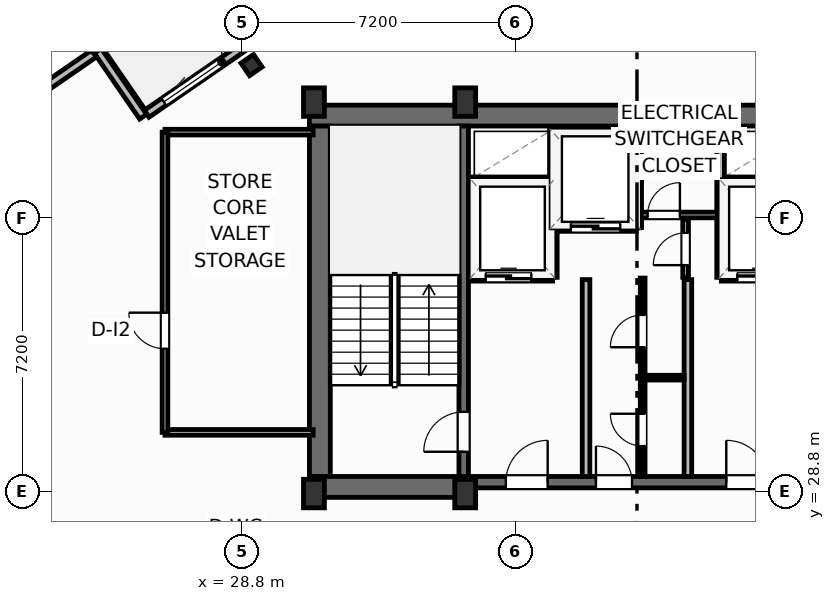
"""IFC4 building model, lengths in metres.
Left out: names, types, materials, properties, quantities, classifications, styles, units other than length and angle.
Written with IfcOpenShell. Run it as: python <this file> out.ifc"""

import sys

from ifc_helpers import new_model, si_unit, direction, frame, frame_2d, origin, origin_2d, place, context, subcontext, project, spatial, rectangle, i_section, extrude, element, fill, save


model = new_model("IFC4")
c1 = context("Model", 3, precision=1e-05, world=origin(), true_north=direction((0.0, 1.0)))
c2 = subcontext(c1, "Body", "Model", "MODEL_VIEW")
j1 = project(units=[si_unit("LENGTHUNIT", "METRE"), si_unit("PLANEANGLEUNIT", "RADIAN")], contexts=[c1])
p1 = place(None, origin())
s1 = spatial("IfcSite", under=j1, at=p1, CompositionType="ELEMENT")
p2 = place(p1, origin())
s2 = spatial("IfcBuilding", under=s1, at=p2, CompositionType="ELEMENT")
p3 = place(p2, frame((0.0, 0.0, 280.4)))
s3 = spatial("IfcBuildingStorey", under=s2, at=p3, CompositionType="ELEMENT", Elevation=280.4)
for number, where, z_axis, x_axis in (
    (1, (30.7, 28.75, 0.0), (0.0, 0.0, 1.0), (1.0, 0.0, 0.0)),
    (2, (34.68, 28.75, 0.0), (0.0, 0.0, 1.0), (1.0, 0.0, 0.0)),
    (3, (30.7, 39.05, 0.0), (0.0, 0.0, 1.0), (1.0, 0.0, 0.0)),
    (4, (34.68, 39.05, 0.0), (0.0, 0.0, 1.0), (1.0, 0.0, 0.0)),
):
    element("IfcColumn", number, at=place(p3, frame(where, z_axis=z_axis, x_axis=x_axis)), inside=s3, PredefinedType="COLUMN", context=c2, shape_type="SweptSolid", body=[
        extrude(rectangle(XDim=0.55, YDim=0.75, at=origin_2d()), origin(), (0.0, 0.0, 1.0), 3.7),
    ])
p4 = place(p3, frame((30.58, 38.695, 0.0), z_axis=(0.0, 0.0, 1.0), x_axis=(1.0, 0.0, 0.0)))
e5 = element("IfcWall", 5, at=p4, inside=s3, PredefinedType="SHEAR", context=c2, shape_type="SweptSolid", body=[
    extrude(rectangle(XDim=17.24, YDim=0.55, at=frame_2d((8.62, 0.0))), origin(), (0.0, 0.0, 1.0), 3.45),
])
p5 = place(p3, frame((30.855, 29.2, 0.0), z_axis=(0.0, 0.0, 1.0), x_axis=(0.0, 1.0, 0.0)))
e6 = element("IfcWall", 6, at=p5, inside=s3, PredefinedType="SHEAR", context=c2, shape_type="SweptSolid", body=[
    extrude(rectangle(XDim=9.22, YDim=0.55, at=frame_2d((4.61, 0.0))), origin(), (0.0, 0.0, 1.0), 3.45),
])
p6 = place(p3, frame((30.58, 28.925, 0.0), z_axis=(0.0, 0.0, 1.0), x_axis=(1.0, 0.0, 0.0)))
e7 = element("IfcWall", 7, at=p6, inside=s3, PredefinedType="SHEAR", context=c2, shape_type="SweptSolid", body=[
    extrude(rectangle(XDim=4.22, YDim=0.55, at=frame_2d((2.11, 0.0))), origin(), (0.0, 0.0, 1.0), 3.45),
])
p7 = place(p3, frame((34.8, 29.05, 0.0), z_axis=(0.0, 0.0, 1.0), x_axis=(1.0, 0.0, 0.0)))
e8 = element("IfcWall", 8, at=p7, inside=s3, PredefinedType="SHEAR", context=c2, shape_type="SweptSolid", body=[
    extrude(rectangle(XDim=8.8, YDim=0.3, at=frame_2d((4.4, 0.0))), origin(), (0.0, 0.0, 1.0), 3.45),
])
p8 = place(p7, frame((0.95, 0.0, 0.0)))
e9 = element("IfcOpeningElement", 9, at=p8, cuts=e8, PredefinedType="OPENING", context=c2, shape_type="SweptSolid", body=[
    extrude(rectangle(XDim=1.1, YDim=2.15, at=frame_2d((0.55, 1.075))), frame((0.0, 0.16, 0.0), z_axis=(0.0, -1.0, 0.0), x_axis=(1.0, 0.0, 0.0)), (0.0, 0.0, 1.0), 0.32),
])
p9 = place(p7, frame((6.75, 0.0, 0.0)))
e10 = element("IfcOpeningElement", 10, at=p9, cuts=e8, PredefinedType="OPENING", context=c2, shape_type="SweptSolid", body=[
    extrude(rectangle(XDim=1.1, YDim=2.15, at=frame_2d((0.55, 1.075))), frame((0.0, 0.16, 0.0), z_axis=(0.0, -1.0, 0.0), x_axis=(1.0, 0.0, 0.0)), (0.0, 0.0, 1.0), 0.32),
])
p10 = place(p7, frame((3.32, 0.0, 0.0)))
e11 = element("IfcOpeningElement", 11, at=p10, cuts=e8, PredefinedType="OPENING", context=c2, shape_type="SweptSolid", body=[
    extrude(rectangle(XDim=0.95, YDim=2.15, at=frame_2d((0.475, 1.075))), frame((0.0, 0.16, 0.0), z_axis=(0.0, -1.0, 0.0), x_axis=(1.0, 0.0, 0.0)), (0.0, 0.0, 1.0), 0.32),
])
p11 = place(p3, frame((34.64, 29.2, 0.0), z_axis=(0.0, 0.0, 1.0), x_axis=(0.0, 1.0, 0.0)))
e12 = element("IfcWall", 12, at=p11, inside=s3, PredefinedType="SHEAR", context=c2, shape_type="SweptSolid", body=[
    extrude(rectangle(XDim=9.22, YDim=0.25, at=frame_2d((4.61, 0.0))), origin(), (0.0, 0.0, 1.0), 3.45),
])
p12 = place(p11, frame((0.65, 0.0, 0.0)))
e13 = element("IfcOpeningElement", 13, at=p12, cuts=e12, PredefinedType="OPENING", context=c2, shape_type="SweptSolid", body=[
    extrude(rectangle(XDim=1.05, YDim=2.15, at=frame_2d((0.525, 1.075))), frame((0.0, 0.135, 0.0), z_axis=(0.0, -1.0, 0.0), x_axis=(1.0, 0.0, 0.0)), (0.0, 0.0, 1.0), 0.27),
])
p13 = place(p3, frame((29.057, 40.025, 0.0), z_axis=(0.0, 0.0, 1.0), x_axis=(0.823532597628, 0.567268949127, 0.0)))
e14 = element("IfcColumn", 14, at=p13, inside=s3, PredefinedType="COLUMN", context=c2, shape_type="SweptSolid", body=[
    extrude(i_section(OverallWidth=0.401, OverallDepth=0.399, WebThickness=0.025, FlangeThickness=0.04, FilletRadius=0.022, at=origin_2d()), origin(), (0.0, 0.0, 1.0), 3.7),
])
p14 = place(p3, frame((26.297, 38.743, 0.0), z_axis=(0.0, 0.0, 1.0), x_axis=(0.823534636215, 0.567265989598, 0.0)))
e15 = element("IfcWall", 15, at=p14, inside=s3, PredefinedType="SOLIDWALL", context=c2, shape_type="SweptSolid", body=[
    extrude(rectangle(XDim=6.0, YDim=0.22, at=frame_2d((3.0, 0.0))), origin(), (0.0, 0.0, 1.0), 2.73),
])
p15 = place(p14, frame((3.5, 0.0, 0.0)))
e16 = element("IfcOpeningElement", 16, at=p15, cuts=e15, PredefinedType="OPENING", context=c2, shape_type="SweptSolid", body=[
    extrude(rectangle(XDim=2.1, YDim=2.3, at=frame_2d((1.05, 1.15))), frame((0.0, 0.12, 0.0), z_axis=(0.0, -1.0, 0.0), x_axis=(1.0, 0.0, 0.0)), (0.0, 0.0, 1.0), 0.24),
])
p16 = place(p14, frame((0.55, 0.0, 0.75)))
e17 = element("IfcOpeningElement", 17, at=p16, cuts=e15, PredefinedType="OPENING", context=c2, shape_type="SweptSolid", body=[
    extrude(rectangle(XDim=1.85, YDim=1.75, at=frame_2d((0.925, 0.875))), frame((0.0, 0.12, 0.0), z_axis=(0.0, -1.0, 0.0), x_axis=(1.0, 0.0, 0.0)), (0.0, 0.0, 1.0), 0.24),
])
p17 = place(p3, frame((26.204, 38.667, 0.0), z_axis=(0.0, 0.0, 1.0), x_axis=(-0.567219383419, 0.823566737474, 0.0)))
e18 = element("IfcWall", 18, at=p17, inside=s3, PredefinedType="SOLIDWALL", context=c2, shape_type="SweptSolid", body=[
    extrude(rectangle(XDim=2.1, YDim=0.22, at=frame_2d((1.05, 0.0))), origin(), (0.0, 0.0, 1.0), 2.73),
])
p18 = place(p3, frame((24.91, 40.325, 0.0), z_axis=(0.0, 0.0, 1.0), x_axis=(-0.823521165086, -0.56728554596, 0.0)))
e19 = element("IfcWall", 19, at=p18, inside=s3, PredefinedType="SOLIDWALL", context=c2, shape_type="SweptSolid", body=[
    extrude(rectangle(XDim=8.035, YDim=0.22, at=frame_2d((4.018, 0.0))), origin(), (0.0, 0.0, 1.0), 2.73),
])
p19 = place(p18, frame((2.968, 0.0, 0.8)))
e20 = element("IfcOpeningElement", 20, at=p19, cuts=e19, PredefinedType="OPENING", context=c2, shape_type="SweptSolid", body=[
    extrude(rectangle(XDim=2.1, YDim=1.75, at=frame_2d((1.05, 0.875))), frame((0.0, 0.12, 0.0), z_axis=(0.0, -1.0, 0.0), x_axis=(1.0, 0.0, 0.0)), (0.0, 0.0, 1.0), 0.24),
])
for number, where, z_axis, x_axis in (
    (21, (37.86, 29.2, 0.0), (0.0, 0.0, 1.0), (0.0, 1.0, 0.0)),
    (22, (40.54, 29.2, 0.0), (0.0, 0.0, 1.0), (0.0, 1.0, 0.0)),
):
    element("IfcWall", number, at=place(p3, frame(where, z_axis=z_axis, x_axis=x_axis)), inside=s3, PredefinedType="PARTITIONING", context=c2, shape_type="SweptSolid", body=[
        extrude(rectangle(XDim=5.18, YDim=0.2, at=frame_2d((2.59, 0.0))), origin(), (0.0, 0.0, 1.0), 3.45),
    ])
p20 = place(p3, frame((34.8, 34.44, 0.0), z_axis=(0.0, 0.0, 1.0), x_axis=(1.0, 0.0, 0.0)))
e23 = element("IfcWall", 23, at=p20, inside=s3, PredefinedType="PARTITIONING", context=c2, shape_type="SweptSolid", body=[
    extrude(rectangle(XDim=2.18, YDim=0.2, at=frame_2d((1.09, 0.0))), origin(), (0.0, 0.0, 1.0), 3.45),
])
p21 = place(p20, frame((0.42, 0.0, 0.0)))
e24 = element("IfcOpeningElement", 24, at=p21, cuts=e23, PredefinedType="OPENING", context=c2, shape_type="SweptSolid", body=[
    extrude(rectangle(XDim=1.2, YDim=2.2, at=frame_2d((0.6, 1.1))), frame((0.0, 0.11, 0.0), z_axis=(0.0, -1.0, 0.0), x_axis=(1.0, 0.0, 0.0)), (0.0, 0.0, 1.0), 0.22),
])
p22 = place(p3, frame((34.8, 36.98, 0.0), z_axis=(0.0, 0.0, 1.0), x_axis=(1.0, 0.0, 0.0)))
e25 = element("IfcWall", 25, at=p22, inside=s3, PredefinedType="PARTITIONING", context=c2, shape_type="SweptSolid", body=[
    extrude(rectangle(XDim=2.18, YDim=0.2, at=frame_2d((1.09, 0.0))), origin(), (0.0, 0.0, 1.0), 3.45),
])
p23 = place(p3, frame((37.0, 34.44, 0.0), z_axis=(0.0, 0.0, 1.0), x_axis=(0.0, 1.0, 0.0)))
e26 = element("IfcWall", 26, at=p23, inside=s3, PredefinedType="PARTITIONING", context=c2, shape_type="SweptSolid", body=[
    extrude(rectangle(XDim=3.9, YDim=0.2, at=frame_2d((1.95, 0.0))), origin(), (0.0, 0.0, 1.0), 3.45),
])
p24 = place(p3, frame((41.42, 34.44, 0.0), z_axis=(0.0, 0.0, 1.0), x_axis=(1.0, 0.0, 0.0)))
e27 = element("IfcWall", 27, at=p24, inside=s3, PredefinedType="PARTITIONING", context=c2, shape_type="SweptSolid", body=[
    extrude(rectangle(XDim=2.18, YDim=0.2, at=frame_2d((1.09, 0.0))), origin(), (0.0, 0.0, 1.0), 3.45),
])
p25 = place(p24, frame((0.42, 0.0, 0.0)))
e28 = element("IfcOpeningElement", 28, at=p25, cuts=e27, PredefinedType="OPENING", context=c2, shape_type="SweptSolid", body=[
    extrude(rectangle(XDim=1.2, YDim=2.2, at=frame_2d((0.6, 1.1))), frame((0.0, 0.11, 0.0), z_axis=(0.0, -1.0, 0.0), x_axis=(1.0, 0.0, 0.0)), (0.0, 0.0, 1.0), 0.22),
])
p26 = place(p3, frame((41.42, 36.98, 0.0), z_axis=(0.0, 0.0, 1.0), x_axis=(1.0, 0.0, 0.0)))
e29 = element("IfcWall", 29, at=p26, inside=s3, PredefinedType="PARTITIONING", context=c2, shape_type="SweptSolid", body=[
    extrude(rectangle(XDim=2.18, YDim=0.2, at=frame_2d((1.09, 0.0))), origin(), (0.0, 0.0, 1.0), 3.45),
])
p27 = place(p3, frame((41.4, 34.44, 0.0), z_axis=(0.0, 0.0, 1.0), x_axis=(0.0, 1.0, 0.0)))
e30 = element("IfcWall", 30, at=p27, inside=s3, PredefinedType="PARTITIONING", context=c2, shape_type="SweptSolid", body=[
    extrude(rectangle(XDim=3.9, YDim=0.2, at=frame_2d((1.95, 0.0))), origin(), (0.0, 0.0, 1.0), 3.45),
])
p28 = place(p3, frame((37.06, 35.75, 0.0), z_axis=(0.0, 0.0, 1.0), x_axis=(1.0, 0.0, 0.0)))
e31 = element("IfcWall", 31, at=p28, inside=s3, PredefinedType="PARTITIONING", context=c2, shape_type="SweptSolid", body=[
    extrude(rectangle(XDim=2.12, YDim=0.2, at=frame_2d((1.06, 0.0))), origin(), (0.0, 0.0, 1.0), 3.45),
])
p29 = place(p28, frame((0.4, 0.0, 0.0)))
e32 = element("IfcOpeningElement", 32, at=p29, cuts=e31, PredefinedType="OPENING", context=c2, shape_type="SweptSolid", body=[
    extrude(rectangle(XDim=1.3, YDim=2.2, at=frame_2d((0.65, 1.1))), frame((0.0, 0.11, 0.0), z_axis=(0.0, -1.0, 0.0), x_axis=(1.0, 0.0, 0.0)), (0.0, 0.0, 1.0), 0.22),
])
p30 = place(p3, frame((39.22, 35.75, 0.0), z_axis=(0.0, 0.0, 1.0), x_axis=(0.0, 1.0, 0.0)))
e33 = element("IfcWall", 33, at=p30, inside=s3, PredefinedType="PARTITIONING", context=c2, shape_type="SweptSolid", body=[
    extrude(rectangle(XDim=2.59, YDim=0.2, at=frame_2d((1.295, 0.0))), origin(), (0.0, 0.0, 1.0), 3.45),
])
p31 = place(p3, frame((39.3, 36.08, 0.0), z_axis=(0.0, 0.0, 1.0), x_axis=(1.0, 0.0, 0.0)))
e34 = element("IfcWall", 34, at=p31, inside=s3, PredefinedType="PARTITIONING", context=c2, shape_type="SweptSolid", body=[
    extrude(rectangle(XDim=2.02, YDim=0.15, at=frame_2d((1.01, 0.0))), origin(), (0.0, 0.0, 1.0), 3.45),
])
p32 = place(p31, frame((0.18, 0.0, 0.0)))
e35 = element("IfcOpeningElement", 35, at=p32, cuts=e34, PredefinedType="OPENING", context=c2, shape_type="SweptSolid", body=[
    extrude(rectangle(XDim=0.85, YDim=2.05, at=frame_2d((0.425, 1.025))), frame((0.0, 0.085, 0.0), z_axis=(0.0, -1.0, 0.0), x_axis=(1.0, 0.0, 0.0)), (0.0, 0.0, 1.0), 0.17),
])
p33 = place(p3, frame((40.48, 34.44, 0.0), z_axis=(0.0, 0.0, 1.0), x_axis=(0.0, 1.0, 0.0)))
e36 = element("IfcWall", 36, at=p33, inside=s3, PredefinedType="PARTITIONING", context=c2, shape_type="SweptSolid", body=[
    extrude(rectangle(XDim=1.52, YDim=0.15, at=frame_2d((0.76, 0.0))), origin(), (0.0, 0.0, 1.0), 3.45),
])
p34 = place(p33, frame((0.32, 0.0, 0.0)))
e37 = element("IfcOpeningElement", 37, at=p34, cuts=e36, PredefinedType="OPENING", context=c2, shape_type="SweptSolid", body=[
    extrude(rectangle(XDim=0.85, YDim=2.05, at=frame_2d((0.425, 1.025))), frame((0.0, 0.085, 0.0), z_axis=(0.0, -1.0, 0.0), x_axis=(1.0, 0.0, 0.0)), (0.0, 0.0, 1.0), 0.17),
])
p35 = place(p3, frame((39.35, 31.8, 0.0), z_axis=(0.0, 0.0, 1.0), x_axis=(1.0, 0.0, 0.0)))
e38 = element("IfcWall", 38, at=p35, inside=s3, PredefinedType="PARTITIONING", context=c2, shape_type="SweptSolid", body=[
    extrude(rectangle(XDim=1.09, YDim=0.125, at=frame_2d((0.545, 0.0))), origin(), (0.0, 0.0, 1.0), 3.45),
])
p36 = place(p3, frame((39.35, 29.2, 0.0), z_axis=(0.0, 0.0, 1.0), x_axis=(0.0, 1.0, 0.0)))
e39 = element("IfcWall", 39, at=p36, inside=s3, PredefinedType="PARTITIONING", context=c2, shape_type="SweptSolid", body=[
    extrude(rectangle(XDim=5.22, YDim=0.125, at=frame_2d((2.61, 0.0))), origin(), (0.0, 0.0, 1.0), 3.45),
])
p37 = place(p36, frame((0.8, 0.0, 0.0)))
e40 = element("IfcOpeningElement", 40, at=p37, cuts=e39, PredefinedType="OPENING", context=c2, shape_type="SweptSolid", body=[
    extrude(rectangle(XDim=0.85, YDim=2.05, at=frame_2d((0.425, 1.025))), frame((0.0, 0.073, 0.0), z_axis=(0.0, -1.0, 0.0), x_axis=(1.0, 0.0, 0.0)), (0.0, 0.0, 1.0), 0.145),
])
p38 = place(p36, frame((3.4, 0.0, 0.0)))
e41 = element("IfcOpeningElement", 41, at=p38, cuts=e39, PredefinedType="OPENING", context=c2, shape_type="SweptSolid", body=[
    extrude(rectangle(XDim=0.85, YDim=2.05, at=frame_2d((0.425, 1.025))), frame((0.0, 0.073, 0.0), z_axis=(0.0, -1.0, 0.0), x_axis=(1.0, 0.0, 0.0)), (0.0, 0.0, 1.0), 0.145),
])
for number, where, z_axis, x_axis in (
    (42, (26.78, 30.36, 0.0), (0.0, 0.0, 1.0), (1.0, 0.0, 0.0)),
    (43, (26.78, 38.26, 0.0), (0.0, 0.0, 1.0), (1.0, 0.0, 0.0)),
):
    element("IfcWall", number, at=place(p3, frame(where, z_axis=z_axis, x_axis=x_axis)), inside=s3, PredefinedType="PARTITIONING", context=c2, shape_type="SweptSolid", body=[
        extrude(rectangle(XDim=3.9, YDim=0.15, at=frame_2d((1.95, 0.0))), origin(), (0.0, 0.0, 1.0), 3.45),
    ])
p39 = place(p3, frame((26.78, 30.36, 0.0), z_axis=(0.0, 0.0, 1.0), x_axis=(0.0, 1.0, 0.0)))
e44 = element("IfcWall", 44, at=p39, inside=s3, PredefinedType="PARTITIONING", context=c2, shape_type="SweptSolid", body=[
    extrude(rectangle(XDim=7.9, YDim=0.15, at=frame_2d((3.95, 0.0))), origin(), (0.0, 0.0, 1.0), 3.45),
])
p40 = place(p39, frame((2.2, 0.0, 0.0)))
e45 = element("IfcOpeningElement", 45, at=p40, cuts=e44, PredefinedType="OPENING", context=c2, shape_type="SweptSolid", body=[
    extrude(rectangle(XDim=0.95, YDim=2.05, at=frame_2d((0.475, 1.025))), frame((0.0, 0.085, 0.0), z_axis=(0.0, -1.0, 0.0), x_axis=(1.0, 0.0, 0.0)), (0.0, 0.0, 1.0), 0.17),
])
p41 = place(p16, origin())
e46 = element("IfcWindow", 46, at=p41, inside=s3, PartitioningType="SINGLE_PANEL", PredefinedType="WINDOW", context=c2, shape_type="SweptSolid", body=[
    extrude(rectangle(XDim=1.85, YDim=1.75, at=frame_2d((0.925, 0.875))), frame((0.0, 0.03, 0.0), z_axis=(0.0, -1.0, 0.0), x_axis=(1.0, 0.0, 0.0)), (0.0, 0.0, 1.0), 0.06),
])
fill(e17, e46)
p42 = place(p12, origin())
e47 = element("IfcDoor", 47, at=p42, inside=s3, OperationType="SINGLE_SWING_LEFT", PredefinedType="DOOR", context=c2, shape_type="SweptSolid", body=[
    extrude(rectangle(XDim=1.05, YDim=2.15, at=frame_2d((0.525, 1.075))), frame((0.0, 0.025, 0.0), z_axis=(0.0, -1.0, 0.0), x_axis=(1.0, 0.0, 0.0)), (0.0, 0.0, 1.0), 0.05),
])
fill(e13, e47)
p43 = place(p8, origin())
e48 = element("IfcDoor", 48, at=p43, inside=s3, OperationType="SINGLE_SWING_RIGHT", PredefinedType="DOOR", context=c2, shape_type="SweptSolid", body=[
    extrude(rectangle(XDim=1.1, YDim=2.15, at=frame_2d((0.55, 1.075))), frame((0.0, 0.025, 0.0), z_axis=(0.0, -1.0, 0.0), x_axis=(1.0, 0.0, 0.0)), (0.0, 0.0, 1.0), 0.05),
])
fill(e9, e48)
p44 = place(p9, origin())
e49 = element("IfcDoor", 49, at=p44, inside=s3, OperationType="SINGLE_SWING_LEFT", PredefinedType="DOOR", context=c2, shape_type="SweptSolid", body=[
    extrude(rectangle(XDim=1.1, YDim=2.15, at=frame_2d((0.55, 1.075))), frame((0.0, 0.025, 0.0), z_axis=(0.0, -1.0, 0.0), x_axis=(1.0, 0.0, 0.0)), (0.0, 0.0, 1.0), 0.05),
])
fill(e10, e49)
p45 = place(p21, origin())
e50 = element("IfcDoor", 50, at=p45, inside=s3, OperationType="SLIDING_TO_LEFT", PredefinedType="DOOR", context=c2, shape_type="SweptSolid", body=[
    extrude(rectangle(XDim=1.2, YDim=2.2, at=frame_2d((0.6, 1.1))), frame((0.0, 0.025, 0.0), z_axis=(0.0, -1.0, 0.0), x_axis=(1.0, 0.0, 0.0)), (0.0, 0.0, 1.0), 0.05),
])
fill(e24, e50)
p46 = place(p25, origin())
e51 = element("IfcDoor", 51, at=p46, inside=s3, OperationType="SLIDING_TO_LEFT", PredefinedType="DOOR", context=c2, shape_type="SweptSolid", body=[
    extrude(rectangle(XDim=1.2, YDim=2.2, at=frame_2d((0.6, 1.1))), frame((0.0, 0.025, 0.0), z_axis=(0.0, -1.0, 0.0), x_axis=(1.0, 0.0, 0.0)), (0.0, 0.0, 1.0), 0.05),
])
fill(e28, e51)
p47 = place(p29, origin())
e52 = element("IfcDoor", 52, at=p47, inside=s3, OperationType="SLIDING_TO_LEFT", PredefinedType="DOOR", context=c2, shape_type="SweptSolid", body=[
    extrude(rectangle(XDim=1.3, YDim=2.2, at=frame_2d((0.65, 1.1))), frame((0.0, 0.025, 0.0), z_axis=(0.0, -1.0, 0.0), x_axis=(1.0, 0.0, 0.0)), (0.0, 0.0, 1.0), 0.05),
])
fill(e32, e52)
p48 = place(p32, origin())
e53 = element("IfcDoor", 53, at=p48, inside=s3, OperationType="SINGLE_SWING_RIGHT", PredefinedType="DOOR", context=c2, shape_type="SweptSolid", body=[
    extrude(rectangle(XDim=0.85, YDim=2.05, at=frame_2d((0.425, 1.025))), frame((0.0, 0.025, 0.0), z_axis=(0.0, -1.0, 0.0), x_axis=(1.0, 0.0, 0.0)), (0.0, 0.0, 1.0), 0.05),
])
fill(e35, e53)
p49 = place(p34, origin())
e54 = element("IfcDoor", 54, at=p49, inside=s3, OperationType="SINGLE_SWING_LEFT", PredefinedType="DOOR", context=c2, shape_type="SweptSolid", body=[
    extrude(rectangle(XDim=0.85, YDim=2.05, at=frame_2d((0.425, 1.025))), frame((0.0, 0.025, 0.0), z_axis=(0.0, -1.0, 0.0), x_axis=(1.0, 0.0, 0.0)), (0.0, 0.0, 1.0), 0.05),
])
fill(e37, e54)
p50 = place(p37, origin())
e55 = element("IfcDoor", 55, at=p50, inside=s3, OperationType="SINGLE_SWING_RIGHT", PredefinedType="DOOR", context=c2, shape_type="SweptSolid", body=[
    extrude(rectangle(XDim=0.85, YDim=2.05, at=frame_2d((0.425, 1.025))), frame((0.0, 0.025, 0.0), z_axis=(0.0, -1.0, 0.0), x_axis=(1.0, 0.0, 0.0)), (0.0, 0.0, 1.0), 0.05),
])
fill(e40, e55)
p51 = place(p38, origin())
e56 = element("IfcDoor", 56, at=p51, inside=s3, OperationType="SINGLE_SWING_LEFT", PredefinedType="DOOR", context=c2, shape_type="SweptSolid", body=[
    extrude(rectangle(XDim=0.85, YDim=2.05, at=frame_2d((0.425, 1.025))), frame((0.0, 0.025, 0.0), z_axis=(0.0, -1.0, 0.0), x_axis=(1.0, 0.0, 0.0)), (0.0, 0.0, 1.0), 0.05),
])
fill(e41, e56)
p52 = place(p10, origin())
e57 = element("IfcDoor", 57, at=p52, inside=s3, OperationType="SINGLE_SWING_LEFT", PredefinedType="DOOR", context=c2, shape_type="SweptSolid", body=[
    extrude(rectangle(XDim=0.95, YDim=2.15, at=frame_2d((0.475, 1.075))), frame((0.0, 0.025, 0.0), z_axis=(0.0, -1.0, 0.0), x_axis=(1.0, 0.0, 0.0)), (0.0, 0.0, 1.0), 0.05),
])
fill(e11, e57)
p53 = place(p40, origin())
e58 = element("IfcDoor", 58, at=p53, inside=s3, OperationType="SINGLE_SWING_RIGHT", PredefinedType="DOOR", context=c2, shape_type="SweptSolid", body=[
    extrude(rectangle(XDim=0.95, YDim=2.05, at=frame_2d((0.475, 1.025))), frame((0.0, 0.025, 0.0), z_axis=(0.0, -1.0, 0.0), x_axis=(1.0, 0.0, 0.0)), (0.0, 0.0, 1.0), 0.05),
])
fill(e45, e58)
save(model, sys.argv[1])
